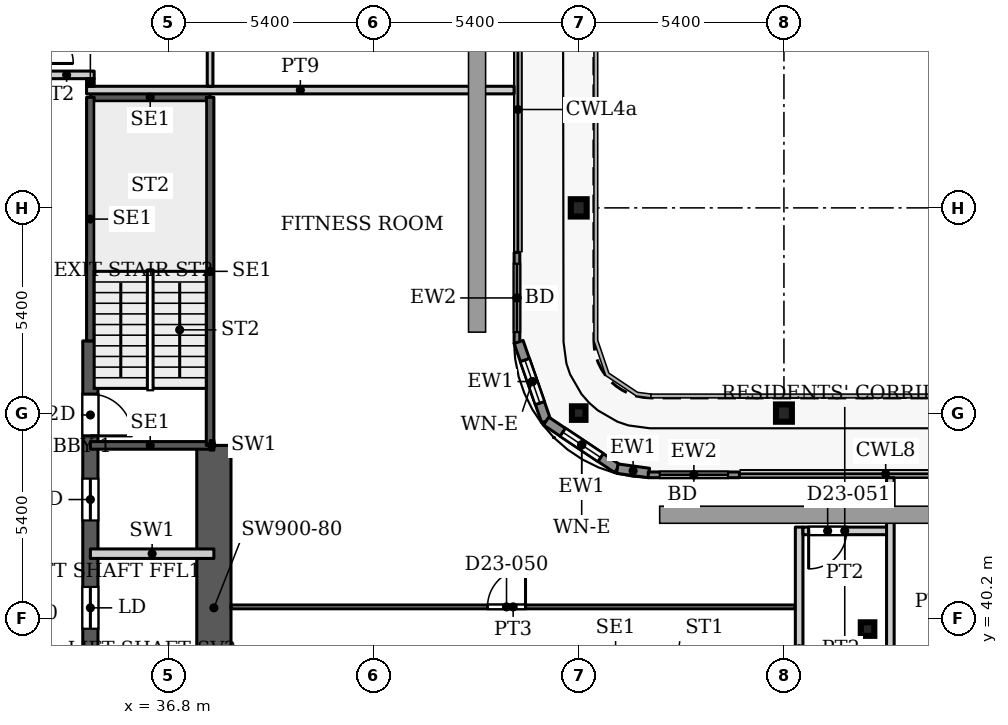
"""IFC4 building model, lengths in metres.
Left out: names, types, materials, properties, quantities, classifications, styles, units other than length and angle.
Written with IfcOpenShell. Run it as: python <this file> out.ifc"""

import sys

from ifc_helpers import new_model, si_unit, direction, frame, frame_2d, origin, origin_2d, place, context, subcontext, project, spatial, rectangle, hollow_rectangle, i_section, extrude, source, transform, mapped, element, fill, save


model = new_model("IFC4")
c1 = context("Model", 3, precision=1e-05, world=origin(), true_north=direction((0.0, 1.0)))
c2 = subcontext(c1, "Body", "Model", "MODEL_VIEW")
j1 = project(units=[si_unit("LENGTHUNIT", "METRE"), si_unit("PLANEANGLEUNIT", "RADIAN")], contexts=[c1])
p1 = place(None, origin())
s1 = spatial("IfcSite", under=j1, at=p1, CompositionType="ELEMENT")
p2 = place(p1, origin())
s2 = spatial("IfcBuilding", under=s1, at=p2, CompositionType="ELEMENT")
p3 = place(p2, frame((0.0, 0.0, 101.9)))
s3 = spatial("IfcBuildingStorey", under=s2, at=p3, CompositionType="ELEMENT", Elevation=101.9)
for number, where, z_axis, x_axis in (
    (1, (53.0, 45.6, 0.0), (0.0, 0.0, 1.0), (1.0, 0.0, 0.0)),
    (2, (47.6, 51.0, 0.0), (0.0, 0.0, 1.0), (1.0, 0.0, 0.0)),
):
    element("IfcColumn", number, at=place(p3, frame(where, z_axis=z_axis, x_axis=x_axis)), inside=s3, PredefinedType="COLUMN", context=c2, shape_type="SweptSolid", body=[
        extrude(i_section(OverallWidth=0.418, OverallDepth=0.455, WebThickness=0.042, FlangeThickness=0.068, FilletRadius=0.014, at=origin_2d()), origin(), (0.0, 0.0, 1.0), 3.9),
    ])
for number, where, z_axis, x_axis in (
    (3, (55.2, 39.916, 0.0), (0.0, 0.0, 1.0), (1.0, 0.0, 0.0)),
    (4, (47.6, 45.6, 0.0), (0.0, 0.0, 1.0), (1.0, 0.0, 0.0)),
):
    element("IfcColumn", number, at=place(p3, frame(where, z_axis=z_axis, x_axis=x_axis)), inside=s3, PredefinedType="COLUMN", context=c2, shape_type="SweptSolid", body=[
        extrude(hollow_rectangle(XDim=0.356, YDim=0.356, WallThickness=0.016, InnerFilletRadius=0.016, OuterFilletRadius=0.032, at=origin_2d()), origin(), (0.0, 0.0, 1.0), 3.9),
    ])
p4 = place(p3, frame((34.75, 29.05, 0.0), z_axis=(0.0, 0.0, 1.0), x_axis=(0.0, 1.0, 0.0)))
e5 = element("IfcWall", 5, at=p4, inside=s3, PredefinedType="SHEAR", context=c2, shape_type="SweptSolid", body=[
    extrude(rectangle(XDim=18.45, YDim=0.4, at=frame_2d((9.225, 0.0))), origin(), (0.0, 0.0, 1.0), 3.9),
])
p5 = place(p4, frame((8.025, 0.0, 0.0)))
e6 = element("IfcOpeningElement", 6, at=p5, cuts=e5, PredefinedType="OPENING", context=c2, shape_type="SweptSolid", body=[
    extrude(rectangle(XDim=1.1, YDim=2.2, at=frame_2d((0.55, 1.1))), frame((0.0, 0.21, 0.0), z_axis=(0.0, -1.0, 0.0), x_axis=(1.0, 0.0, 0.0)), (0.0, 0.0, 1.0), 0.42),
])
p6 = place(p4, frame((10.875, 0.0, 0.0)))
e7 = element("IfcOpeningElement", 7, at=p6, cuts=e5, PredefinedType="OPENING", context=c2, shape_type="SweptSolid", body=[
    extrude(rectangle(XDim=1.1, YDim=2.2, at=frame_2d((0.55, 1.1))), frame((0.0, 0.21, 0.0), z_axis=(0.0, -1.0, 0.0), x_axis=(1.0, 0.0, 0.0)), (0.0, 0.0, 1.0), 0.42),
])
p7 = place(p4, frame((13.725, 0.0, 0.0)))
e8 = element("IfcOpeningElement", 8, at=p7, cuts=e5, PredefinedType="OPENING", context=c2, shape_type="SweptSolid", body=[
    extrude(rectangle(XDim=1.1, YDim=2.2, at=frame_2d((0.55, 1.1))), frame((0.0, 0.21, 0.0), z_axis=(0.0, -1.0, 0.0), x_axis=(1.0, 0.0, 0.0)), (0.0, 0.0, 1.0), 0.42),
])
p8 = place(p4, frame((15.95, 0.0, 0.0)))
e9 = element("IfcOpeningElement", 9, at=p8, cuts=e5, PredefinedType="OPENING", context=c2, shape_type="SweptSolid", body=[
    extrude(rectangle(XDim=1.1, YDim=2.2, at=frame_2d((0.55, 1.1))), frame((0.0, 0.21, 0.0), z_axis=(0.0, -1.0, 0.0), x_axis=(1.0, 0.0, 0.0)), (0.0, 0.0, 1.0), 0.42),
])
p9 = place(p3, frame((38.0, 36.2, 0.0), z_axis=(0.0, 0.0, 1.0), x_axis=(0.0, 1.0, 0.0)))
e10 = element("IfcWall", 10, at=p9, inside=s3, PredefinedType="SHEAR", context=c2, shape_type="SweptSolid", body=[
    extrude(rectangle(XDim=8.55, YDim=0.9, at=frame_2d((4.275, 0.0))), origin(), (0.0, 0.0, 1.0), 3.9),
])
p10 = place(p3, frame((45.975, 49.83, 0.0), z_axis=(0.0, 0.0, 1.0), x_axis=(0.0, -1.0, 0.0)))
e11 = element("IfcWall", 11, at=p10, inside=s3, PredefinedType="SOLIDWALL", context=c2, shape_type="SweptSolid", body=[
    extrude(rectangle(XDim=2.4, YDim=0.15, at=frame_2d((1.2, 0.0))), origin(), (0.0, 0.0, 1.0), 3.75),
])
p11 = place(p10, frame((0.3, 0.0, 0.0)))
e12 = element("IfcOpeningElement", 12, at=p11, cuts=e11, PredefinedType="OPENING", context=c2, shape_type="SweptSolid", body=[
    extrude(rectangle(XDim=1.8, YDim=2.4, at=frame_2d((0.9, 1.2))), frame((0.0, 0.085, 0.0), z_axis=(0.0, -1.0, 0.0), x_axis=(1.0, 0.0, 0.0)), (0.0, 0.0, 1.0), 0.17),
])
p12 = place(p3, frame((46.018, 47.471, 0.0), z_axis=(0.0, 0.0, 1.0), x_axis=(0.328791208903, -0.944402637093, 0.0)))
e13 = element("IfcWall", 13, at=p12, inside=s3, PredefinedType="SOLIDWALL", context=c2, shape_type="SweptSolid", body=[
    extrude(rectangle(XDim=2.205, YDim=0.25, at=frame_2d((1.102, 0.0))), origin(), (0.0, 0.0, 1.0), 3.75),
])
p13 = place(p12, frame((0.503, 0.0, 0.6)))
e14 = element("IfcOpeningElement", 14, at=p13, cuts=e13, PredefinedType="OPENING", context=c2, shape_type="SweptSolid", body=[
    extrude(rectangle(XDim=1.2, YDim=2.1, at=frame_2d((0.6, 1.05))), frame((0.0, 0.135, 0.0), z_axis=(0.0, -1.0, 0.0), x_axis=(1.0, 0.0, 0.0)), (0.0, 0.0, 1.0), 0.27),
])
p14 = place(p3, frame((46.743, 45.389, 0.0), z_axis=(0.0, 0.0, 1.0), x_axis=(0.831449265529, -0.555600682912, 0.0)))
e15 = element("IfcWall", 15, at=p14, inside=s3, PredefinedType="SOLIDWALL", context=c2, shape_type="SweptSolid", body=[
    extrude(rectangle(XDim=2.251, YDim=0.25, at=frame_2d((1.126, 0.0))), origin(), (0.0, 0.0, 1.0), 3.75),
])
p15 = place(p14, frame((0.525, 0.0, 0.6)))
e16 = element("IfcOpeningElement", 16, at=p15, cuts=e15, PredefinedType="OPENING", context=c2, shape_type="SweptSolid", body=[
    extrude(rectangle(XDim=1.2, YDim=2.1, at=frame_2d((0.6, 1.05))), frame((0.0, 0.135, 0.0), z_axis=(0.0, -1.0, 0.0), x_axis=(1.0, 0.0, 0.0)), (0.0, 0.0, 1.0), 0.27),
])
p16 = place(p3, frame((48.615, 44.138, 0.0), z_axis=(0.0, 0.0, 1.0), x_axis=(0.990741504246, -0.135761819977, 0.0)))
e17 = element("IfcWall", 17, at=p16, inside=s3, PredefinedType="SOLIDWALL", context=c2, shape_type="SweptSolid", body=[
    extrude(rectangle(XDim=0.84, YDim=0.25, at=frame_2d((0.42, 0.0))), origin(), (0.0, 0.0, 1.0), 3.75),
])
p17 = place(p3, frame((49.43, 43.975, 0.0), z_axis=(0.0, 0.0, 1.0), x_axis=(1.0, 0.0, 0.0)))
e18 = element("IfcWall", 18, at=p17, inside=s3, PredefinedType="SOLIDWALL", context=c2, shape_type="SweptSolid", body=[
    extrude(rectangle(XDim=2.4, YDim=0.15, at=frame_2d((1.2, 0.0))), origin(), (0.0, 0.0, 1.0), 3.75),
])
p18 = place(p17, frame((0.3, 0.0, 0.0)))
e19 = element("IfcOpeningElement", 19, at=p18, cuts=e18, PredefinedType="OPENING", context=c2, shape_type="SweptSolid", body=[
    extrude(rectangle(XDim=1.8, YDim=2.4, at=frame_2d((0.9, 1.2))), frame((0.0, 0.085, 0.0), z_axis=(0.0, -1.0, 0.0), x_axis=(1.0, 0.0, 0.0)), (0.0, 0.0, 1.0), 0.17),
])
for number, where, z_axis, x_axis in (
    (20, (34.75, 44.75, 0.0), (0.0, 0.0, 1.0), (1.0, 0.0, 0.0)),
    (21, (34.75, 53.91, 0.0), (0.0, 0.0, 1.0), (1.0, 0.0, 0.0)),
):
    element("IfcWall", number, at=place(p3, frame(where, z_axis=z_axis, x_axis=x_axis)), inside=s3, PredefinedType="SHEAR", context=c2, shape_type="SweptSolid", body=[
        extrude(rectangle(XDim=3.15, YDim=0.2, at=frame_2d((1.575, 0.0))), origin(), (0.0, 0.0, 1.0), 3.9),
    ])
p19 = place(p3, frame((34.75, 47.5, 0.0), z_axis=(0.0, 0.0, 1.0), x_axis=(0.0, 1.0, 0.0)))
e22 = element("IfcWall", 22, at=p19, inside=s3, PredefinedType="SHEAR", context=c2, shape_type="SweptSolid", body=[
    extrude(rectangle(XDim=6.41, YDim=0.2, at=frame_2d((3.205, 0.0))), origin(), (0.0, 0.0, 1.0), 3.9),
])
p20 = place(p3, frame((37.9, 44.75, 0.0), z_axis=(0.0, 0.0, 1.0), x_axis=(0.0, 1.0, 0.0)))
e23 = element("IfcWall", 23, at=p20, inside=s3, PredefinedType="SHEAR", context=c2, shape_type="SweptSolid", body=[
    extrude(rectangle(XDim=9.16, YDim=0.2, at=frame_2d((4.58, 0.0))), origin(), (0.0, 0.0, 1.0), 3.9),
])
p21 = place(p3, frame((34.75, 41.9, 0.0), z_axis=(0.0, 0.0, 1.0), x_axis=(1.0, 0.0, 0.0)))
e24 = element("IfcWall", 24, at=p21, inside=s3, PredefinedType="PARTITIONING", context=c2, shape_type="SweptSolid", body=[
    extrude(rectangle(XDim=3.25, YDim=0.25, at=frame_2d((1.625, 0.0))), origin(), (0.0, 0.0, 1.0), 3.9),
])
p22 = place(p3, frame((37.9, 44.75, 0.0), z_axis=(0.0, 0.0, 1.0), x_axis=(1.0, 0.0, 0.0)))
e25 = element("IfcWall", 25, at=p22, inside=s3, PredefinedType="PARTITIONING", context=c2, shape_type="SweptSolid", body=[
    extrude(rectangle(XDim=0.1, YDim=0.25, at=frame_2d((0.05, 0.0))), origin(), (0.0, 0.0, 1.0), 3.9),
])
p23 = place(p3, frame((33.4, 54.5, 0.0), z_axis=(0.0, 0.0, 1.0), x_axis=(1.0, 0.0, 0.0)))
e26 = element("IfcWall", 26, at=p23, inside=s3, PredefinedType="PARTITIONING", context=c2, shape_type="SweptSolid", body=[
    extrude(rectangle(XDim=1.45, YDim=0.2, at=frame_2d((0.725, 0.0))), origin(), (0.0, 0.0, 1.0), 3.6),
])
p24 = place(p3, frame((34.65, 54.1, 0.0), z_axis=(0.0, 0.0, 1.0), x_axis=(1.0, 0.0, 0.0)))
e27 = element("IfcWall", 27, at=p24, inside=s3, PredefinedType="PARTITIONING", context=c2, shape_type="SweptSolid", body=[
    extrude(rectangle(XDim=11.25, YDim=0.2, at=frame_2d((5.625, 0.0))), origin(), (0.0, 0.0, 1.0), 3.6),
])
p25 = place(p3, frame((34.75, 54.2, 0.0), z_axis=(0.0, 0.0, 1.0), x_axis=(0.0, 1.0, 0.0)))
e28 = element("IfcWall", 28, at=p25, inside=s3, PredefinedType="PARTITIONING", context=c2, shape_type="SweptSolid", body=[
    extrude(rectangle(XDim=0.2, YDim=0.2, at=frame_2d((0.1, 0.0))), origin(), (0.0, 0.0, 1.0), 3.6),
])
p26 = place(p3, frame((37.9, 54.2, 0.0), z_axis=(0.0, 0.0, 1.0), x_axis=(0.0, 1.0, 0.0)))
e29 = element("IfcWall", 29, at=p26, inside=s3, PredefinedType="PARTITIONING", context=c2, shape_type="SweptSolid", body=[
    extrude(rectangle(XDim=13.3, YDim=0.15, at=frame_2d((6.65, 0.0))), origin(), (0.0, 0.0, 1.0), 3.6),
])
p27 = place(p26, frame((6.2, 0.0, 0.0)))
e30 = element("IfcOpeningElement", 30, at=p27, cuts=e29, PredefinedType="OPENING", context=c2, shape_type="SweptSolid", body=[
    extrude(rectangle(XDim=0.9, YDim=2.1, at=frame_2d((0.45, 1.05))), frame((0.0, 0.085, 0.0), z_axis=(0.0, -1.0, 0.0), x_axis=(1.0, 0.0, 0.0)), (0.0, 0.0, 1.0), 0.17),
])
p28 = place(p26, frame((1.95, 0.0, 0.0)))
e31 = element("IfcOpeningElement", 31, at=p28, cuts=e29, PredefinedType="OPENING", context=c2, shape_type="SweptSolid", body=[
    extrude(rectangle(XDim=1.0, YDim=2.1, at=frame_2d((0.5, 1.05))), frame((0.0, 0.085, 0.0), z_axis=(0.0, -1.0, 0.0), x_axis=(1.0, 0.0, 0.0)), (0.0, 0.0, 1.0), 0.17),
])
p29 = place(p26, frame((9.35, 0.0, 0.0)))
e32 = element("IfcOpeningElement", 32, at=p29, cuts=e29, PredefinedType="OPENING", context=c2, shape_type="SweptSolid", body=[
    extrude(rectangle(XDim=0.9, YDim=2.1, at=frame_2d((0.45, 1.05))), frame((0.0, 0.085, 0.0), z_axis=(0.0, -1.0, 0.0), x_axis=(1.0, 0.0, 0.0)), (0.0, 0.0, 1.0), 0.17),
])
p30 = place(p3, frame((38.449, 40.5, 0.0), z_axis=(0.0, 0.0, 1.0), x_axis=(1.0, 0.0, 0.0)))
e33 = element("IfcWall", 33, at=p30, inside=s3, PredefinedType="PARTITIONING", context=c2, shape_type="SweptSolid", body=[
    extrude(rectangle(XDim=14.851, YDim=0.1, at=frame_2d((7.426, 0.0))), origin(), (0.0, 0.0, 1.0), 3.6),
])
p31 = place(p30, frame((6.751, 0.0, 0.0)))
e34 = element("IfcOpeningElement", 34, at=p31, cuts=e33, PredefinedType="OPENING", context=c2, shape_type="SweptSolid", body=[
    extrude(rectangle(XDim=1.0, YDim=2.1, at=frame_2d((0.5, 1.05))), frame((0.0, 0.06, 0.0), z_axis=(0.0, -1.0, 0.0), x_axis=(1.0, 0.0, 0.0)), (0.0, 0.0, 1.0), 0.12),
])
p32 = place(p3, frame((53.4, 36.199, 0.0), z_axis=(0.0, 0.0, 1.0), x_axis=(0.0, 1.0, 0.0)))
e35 = element("IfcWall", 35, at=p32, inside=s3, PredefinedType="PARTITIONING", context=c2, shape_type="SweptSolid", body=[
    extrude(rectangle(XDim=6.401, YDim=0.2, at=frame_2d((3.201, 0.0))), origin(), (0.0, 0.0, 1.0), 3.6),
])
p33 = place(p3, frame((53.5, 42.5, 0.0), z_axis=(0.0, 0.0, 1.0), x_axis=(1.0, 0.0, 0.0)))
e36 = element("IfcWall", 36, at=p33, inside=s3, PredefinedType="PARTITIONING", context=c2, shape_type="SweptSolid", body=[
    extrude(rectangle(XDim=2.2, YDim=0.2, at=frame_2d((1.1, 0.0))), origin(), (0.0, 0.0, 1.0), 3.6),
])
p34 = place(p33, frame((0.15, 0.0, 0.0)))
e37 = element("IfcOpeningElement", 37, at=p34, cuts=e36, PredefinedType="OPENING", context=c2, shape_type="SweptSolid", body=[
    extrude(rectangle(XDim=1.0, YDim=2.1, at=frame_2d((0.5, 1.05))), frame((0.0, 0.11, 0.0), z_axis=(0.0, -1.0, 0.0), x_axis=(1.0, 0.0, 0.0)), (0.0, 0.0, 1.0), 0.22),
])
p35 = place(p3, frame((55.8, 30.4, 0.0), z_axis=(0.0, 0.0, 1.0), x_axis=(0.0, 1.0, 0.0)))
e38 = element("IfcWall", 38, at=p35, inside=s3, PredefinedType="PARTITIONING", context=c2, shape_type="SweptSolid", body=[
    extrude(rectangle(XDim=13.5, YDim=0.2, at=frame_2d((6.75, 0.0))), origin(), (0.0, 0.0, 1.0), 3.6),
])
m1 = source(origin(), c2, "Body", "SweptSolid", [
    extrude(rectangle(XDim=1.8, YDim=2.4, at=frame_2d((0.9, 1.2))), frame((0.0, 0.025, 0.0), z_axis=(0.0, -1.0, 0.0), x_axis=(1.0, 0.0, 0.0)), (0.0, 0.0, 1.0), 0.05),
])
p36 = place(p11, origin())
e39 = element("IfcDoor", 39, at=p36, inside=s3, OperationType="SLIDING_TO_LEFT", PredefinedType="DOOR", context=c2, shape_type="MappedRepresentation", body=[
    mapped(m1, transform((0.0, 0.0, 0.0), x_axis=(1.0, 0.0, 0.0), y_axis=(0.0, 1.0, 0.0), z_axis=(0.0, 0.0, 1.0), scale=1.0)),
])
fill(e12, e39)
m2 = source(origin(), c2, "Body", "SweptSolid", [
    extrude(rectangle(XDim=1.2, YDim=2.1, at=frame_2d((0.6, 1.05))), frame((0.0, 0.03, 0.0), z_axis=(0.0, -1.0, 0.0), x_axis=(1.0, 0.0, 0.0)), (0.0, 0.0, 1.0), 0.06),
])
p37 = place(p13, origin())
e40 = element("IfcWindow", 40, at=p37, inside=s3, PartitioningType="SINGLE_PANEL", PredefinedType="WINDOW", context=c2, shape_type="MappedRepresentation", body=[
    mapped(m2, transform((0.0, 0.0, 0.0), x_axis=(1.0, 0.0, 0.0), y_axis=(0.0, 1.0, 0.0), z_axis=(0.0, 0.0, 1.0), scale=1.0)),
])
fill(e14, e40)
p38 = place(p15, origin())
e41 = element("IfcWindow", 41, at=p38, inside=s3, PartitioningType="SINGLE_PANEL", PredefinedType="WINDOW", context=c2, shape_type="MappedRepresentation", body=[
    mapped(m2, transform((0.0, 0.0, 0.0), x_axis=(1.0, 0.0, 0.0), y_axis=(0.0, 1.0, 0.0), z_axis=(0.0, 0.0, 1.0), scale=1.0)),
])
fill(e16, e41)
p39 = place(p18, origin())
e42 = element("IfcDoor", 42, at=p39, inside=s3, OperationType="SLIDING_TO_LEFT", PredefinedType="DOOR", context=c2, shape_type="MappedRepresentation", body=[
    mapped(m1, transform((0.0, 0.0, 0.0), x_axis=(1.0, 0.0, 0.0), y_axis=(0.0, 1.0, 0.0), z_axis=(0.0, 0.0, 1.0), scale=1.0)),
])
fill(e19, e42)
m3 = source(origin(), c2, "Body", "SweptSolid", [
    extrude(rectangle(XDim=1.1, YDim=2.2, at=frame_2d((0.55, 1.1))), frame((0.0, 0.025, 0.0), z_axis=(0.0, -1.0, 0.0), x_axis=(1.0, 0.0, 0.0)), (0.0, 0.0, 1.0), 0.05),
])
p40 = place(p6, origin())
e43 = element("IfcDoor", 43, at=p40, inside=s3, OperationType="SLIDING_TO_LEFT", PredefinedType="DOOR", context=c2, shape_type="MappedRepresentation", body=[
    mapped(m3, transform((0.0, 0.0, 0.0), x_axis=(1.0, 0.0, 0.0), y_axis=(0.0, 1.0, 0.0), z_axis=(0.0, 0.0, 1.0), scale=1.0)),
])
fill(e7, e43)
p41 = place(p7, origin())
e44 = element("IfcDoor", 44, at=p41, inside=s3, OperationType="SLIDING_TO_LEFT", PredefinedType="DOOR", context=c2, shape_type="MappedRepresentation", body=[
    mapped(m3, transform((0.0, 0.0, 0.0), x_axis=(1.0, 0.0, 0.0), y_axis=(0.0, 1.0, 0.0), z_axis=(0.0, 0.0, 1.0), scale=1.0)),
])
fill(e8, e44)
m4 = source(origin(), c2, "Body", "SweptSolid", [
    extrude(rectangle(XDim=1.1, YDim=2.2, at=frame_2d((0.55, 1.1))), frame((0.0, 0.025, 0.0), z_axis=(0.0, -1.0, 0.0), x_axis=(1.0, 0.0, 0.0)), (0.0, 0.0, 1.0), 0.05),
])
p42 = place(p8, origin())
e45 = element("IfcDoor", 45, at=p42, inside=s3, OperationType="SINGLE_SWING_RIGHT", PredefinedType="DOOR", context=c2, shape_type="MappedRepresentation", body=[
    mapped(m4, transform((0.0, 0.0, 0.0), x_axis=(1.0, 0.0, 0.0), y_axis=(0.0, 1.0, 0.0), z_axis=(0.0, 0.0, 1.0), scale=1.0)),
])
fill(e9, e45)
m5 = source(origin(), c2, "Body", "SweptSolid", [
    extrude(rectangle(XDim=1.0, YDim=2.1, at=frame_2d((0.5, 1.05))), frame((0.0, 0.025, 0.0), z_axis=(0.0, -1.0, 0.0), x_axis=(1.0, 0.0, 0.0)), (0.0, 0.0, 1.0), 0.05),
])
p43 = place(p31, origin())
e46 = element("IfcDoor", 46, at=p43, inside=s3, OperationType="SINGLE_SWING_LEFT", PredefinedType="DOOR", context=c2, shape_type="MappedRepresentation", body=[
    mapped(m5, transform((0.0, 0.0, 0.0), x_axis=(1.0, 0.0, 0.0), y_axis=(0.0, 1.0, 0.0), z_axis=(0.0, 0.0, 1.0), scale=1.0)),
])
fill(e34, e46)
m6 = source(origin(), c2, "Body", "SweptSolid", [
    extrude(rectangle(XDim=1.0, YDim=2.1, at=frame_2d((0.5, 1.05))), frame((0.0, 0.025, 0.0), z_axis=(0.0, -1.0, 0.0), x_axis=(1.0, 0.0, 0.0)), (0.0, 0.0, 1.0), 0.05),
])
p44 = place(p34, origin())
e47 = element("IfcDoor", 47, at=p44, inside=s3, OperationType="SINGLE_SWING_RIGHT", PredefinedType="DOOR", context=c2, shape_type="MappedRepresentation", body=[
    mapped(m6, transform((0.0, 0.0, 0.0), x_axis=(1.0, 0.0, 0.0), y_axis=(0.0, 1.0, 0.0), z_axis=(0.0, 0.0, 1.0), scale=1.0)),
])
fill(e37, e47)
save(model, sys.argv[1])
